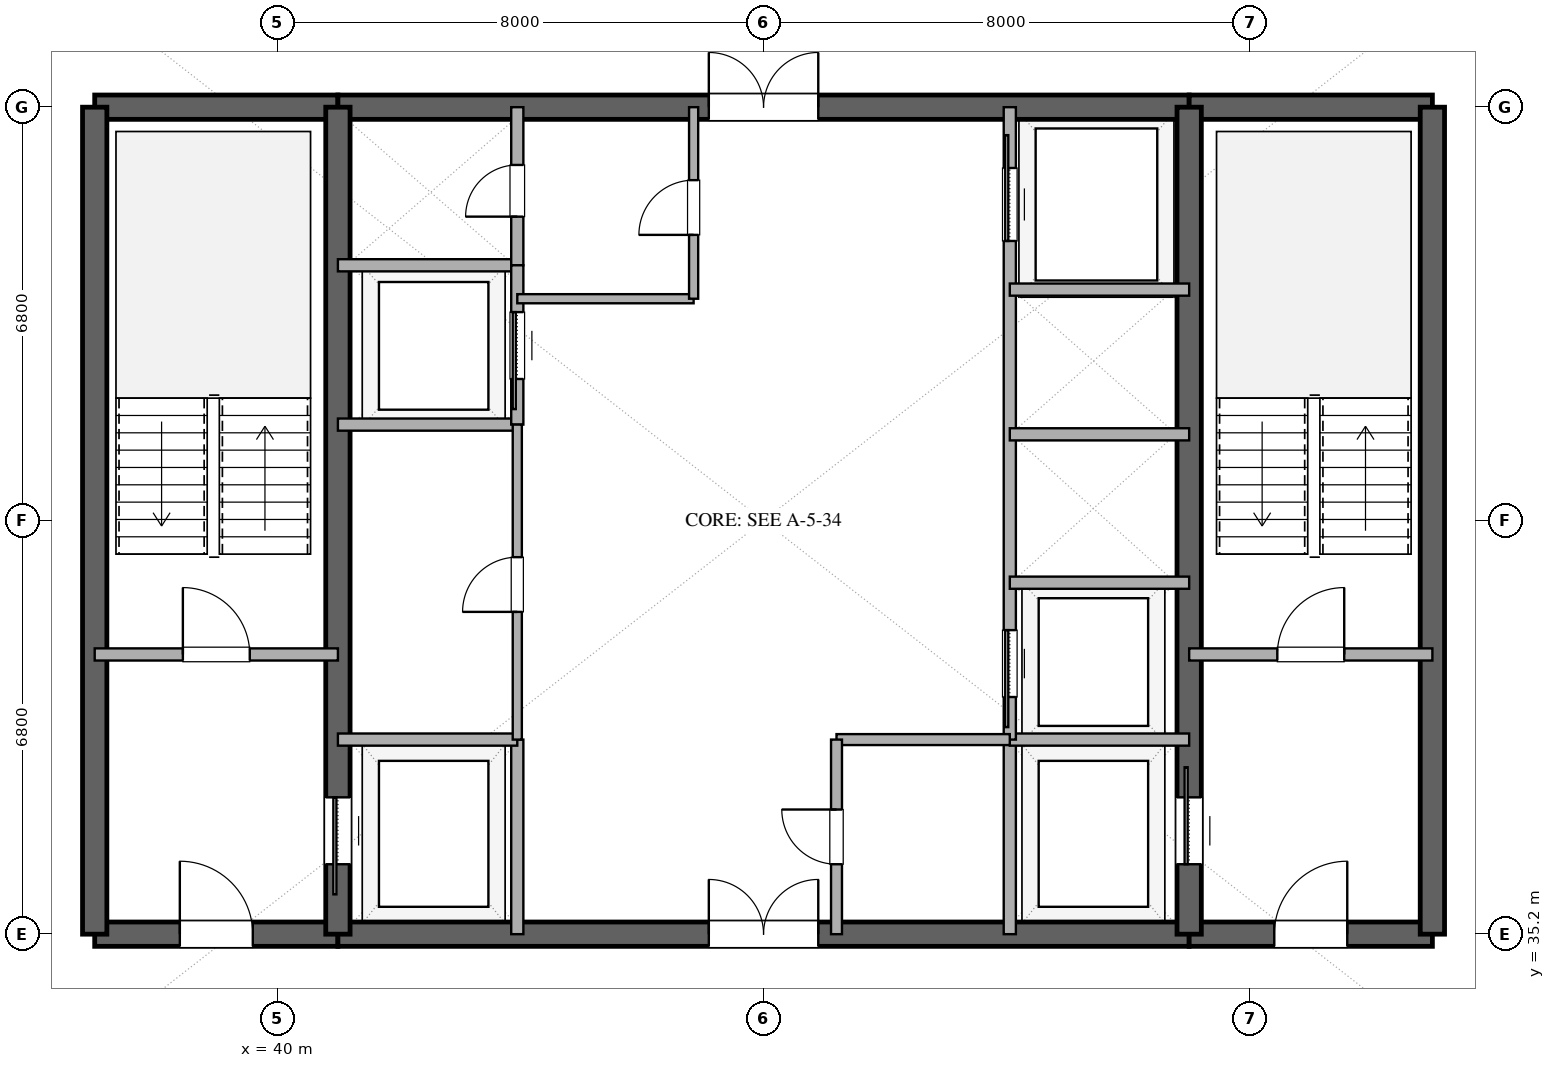
"""IFC4 building model, lengths in metres.
Left out: names, types, materials, properties, quantities, classifications, styles, units other than length and angle.
Written with IfcOpenShell. Run it as: python <this file> out.ifc"""

import sys

from ifc_helpers import new_model, si_unit, direction, frame, frame_2d, origin, place, context, subcontext, project, spatial, rectangle, extrude, element, fill, save


model = new_model("IFC4")
c1 = context("Model", 3, precision=1e-05, world=origin(), true_north=direction((0.0, 1.0)))
c2 = subcontext(c1, "Body", "Model", "MODEL_VIEW")
j1 = project(units=[si_unit("LENGTHUNIT", "METRE"), si_unit("PLANEANGLEUNIT", "RADIAN")], contexts=[c1])
p1 = place(None, origin())
s1 = spatial("IfcSite", under=j1, at=p1, CompositionType="ELEMENT")
p2 = place(p1, origin())
s2 = spatial("IfcBuilding", under=s1, at=p2, CompositionType="ELEMENT")
p3 = place(p2, frame((0.0, 0.0, 235.2)))
s3 = spatial("IfcBuildingStorey", under=s2, at=p3, CompositionType="ELEMENT", Elevation=235.2)
p4 = place(p3, frame((37.0, 35.2, 0.0), z_axis=(0.0, 0.0, 1.0), x_axis=(1.0, 0.0, 0.0)))
e1 = element("IfcWall", 1, at=p4, inside=s3, PredefinedType="SHEAR", context=c2, shape_type="SweptSolid", body=[
    extrude(rectangle(XDim=4.0, YDim=0.4, at=frame_2d((2.0, 0.0))), origin(), (0.0, 0.0, 1.0), 3.36),
])
p5 = place(p4, frame((1.4, 0.0, 0.0)))
e2 = element("IfcOpeningElement", 2, at=p5, cuts=e1, PredefinedType="OPENING", context=c2, shape_type="SweptSolid", body=[
    extrude(rectangle(XDim=1.2, YDim=2.15, at=frame_2d((0.6, 1.075))), frame((0.0, 0.21, 0.0), z_axis=(0.0, -1.0, 0.0), x_axis=(1.0, 0.0, 0.0)), (0.0, 0.0, 1.0), 0.42),
])
p6 = place(p3, frame((41.0, 35.2, 0.0), z_axis=(0.0, 0.0, 1.0), x_axis=(1.0, 0.0, 0.0)))
e3 = element("IfcWall", 3, at=p6, inside=s3, PredefinedType="SHEAR", context=c2, shape_type="SweptSolid", body=[
    extrude(rectangle(XDim=14.0, YDim=0.4, at=frame_2d((7.0, 0.0))), origin(), (0.0, 0.0, 1.0), 3.36),
])
p7 = place(p6, frame((6.1, 0.0, 0.0)))
e4 = element("IfcOpeningElement", 4, at=p7, cuts=e3, PredefinedType="OPENING", context=c2, shape_type="SweptSolid", body=[
    extrude(rectangle(XDim=1.8, YDim=2.25, at=frame_2d((0.9, 1.125))), frame((0.0, 0.21, 0.0), z_axis=(0.0, -1.0, 0.0), x_axis=(1.0, 0.0, 0.0)), (0.0, 0.0, 1.0), 0.42),
])
p8 = place(p3, frame((55.0, 35.2, 0.0), z_axis=(0.0, 0.0, 1.0), x_axis=(1.0, 0.0, 0.0)))
e5 = element("IfcWall", 5, at=p8, inside=s3, PredefinedType="SHEAR", context=c2, shape_type="SweptSolid", body=[
    extrude(rectangle(XDim=4.0, YDim=0.4, at=frame_2d((2.0, 0.0))), origin(), (0.0, 0.0, 1.0), 3.36),
])
p9 = place(p8, frame((1.4, 0.0, 0.0)))
e6 = element("IfcOpeningElement", 6, at=p9, cuts=e5, PredefinedType="OPENING", context=c2, shape_type="SweptSolid", body=[
    extrude(rectangle(XDim=1.2, YDim=2.15, at=frame_2d((0.6, 1.075))), frame((0.0, 0.21, 0.0), z_axis=(0.0, -1.0, 0.0), x_axis=(1.0, 0.0, 0.0)), (0.0, 0.0, 1.0), 0.42),
])
p10 = place(p3, frame((37.0, 48.8, 0.0), z_axis=(0.0, 0.0, 1.0), x_axis=(1.0, 0.0, 0.0)))
e7 = element("IfcWall", 7, at=p10, inside=s3, PredefinedType="SHEAR", context=c2, shape_type="SweptSolid", body=[
    extrude(rectangle(XDim=4.0, YDim=0.4, at=frame_2d((2.0, 0.0))), origin(), (0.0, 0.0, 1.0), 3.36),
])
p11 = place(p3, frame((41.0, 48.8, 0.0), z_axis=(0.0, 0.0, 1.0), x_axis=(1.0, 0.0, 0.0)))
e8 = element("IfcWall", 8, at=p11, inside=s3, PredefinedType="SHEAR", context=c2, shape_type="SweptSolid", body=[
    extrude(rectangle(XDim=14.0, YDim=0.4, at=frame_2d((7.0, 0.0))), origin(), (0.0, 0.0, 1.0), 3.36),
])
p12 = place(p11, frame((6.1, 0.0, 0.0)))
e9 = element("IfcOpeningElement", 9, at=p12, cuts=e8, PredefinedType="OPENING", context=c2, shape_type="SweptSolid", body=[
    extrude(rectangle(XDim=1.8, YDim=2.25, at=frame_2d((0.9, 1.125))), frame((0.0, 0.21, 0.0), z_axis=(0.0, -1.0, 0.0), x_axis=(1.0, 0.0, 0.0)), (0.0, 0.0, 1.0), 0.42),
])
p13 = place(p3, frame((55.0, 48.8, 0.0), z_axis=(0.0, 0.0, 1.0), x_axis=(1.0, 0.0, 0.0)))
e10 = element("IfcWall", 10, at=p13, inside=s3, PredefinedType="SHEAR", context=c2, shape_type="SweptSolid", body=[
    extrude(rectangle(XDim=4.0, YDim=0.4, at=frame_2d((2.0, 0.0))), origin(), (0.0, 0.0, 1.0), 3.36),
])
for number, where, z_axis, x_axis in (
    (11, (37.0, 35.2, 0.0), (0.0, 0.0, 1.0), (0.0, 1.0, 0.0)),
    (12, (59.0, 35.2, 0.0), (0.0, 0.0, 1.0), (0.0, 1.0, 0.0)),
):
    element("IfcWall", number, at=place(p3, frame(where, z_axis=z_axis, x_axis=x_axis)), inside=s3, PredefinedType="SHEAR", context=c2, shape_type="SweptSolid", body=[
        extrude(rectangle(XDim=13.6, YDim=0.4, at=frame_2d((6.8, 0.0))), origin(), (0.0, 0.0, 1.0), 3.36),
    ])
p14 = place(p3, frame((41.0, 35.2, 0.0), z_axis=(0.0, 0.0, 1.0), x_axis=(0.0, 1.0, 0.0)))
e13 = element("IfcWall", 13, at=p14, inside=s3, PredefinedType="SHEAR", context=c2, shape_type="SweptSolid", body=[
    extrude(rectangle(XDim=13.6, YDim=0.4, at=frame_2d((6.8, 0.0))), origin(), (0.0, 0.0, 1.0), 3.36),
])
p15 = place(p14, frame((1.15, 0.0, 0.0)))
e14 = element("IfcOpeningElement", 14, at=p15, cuts=e13, PredefinedType="OPENING", context=c2, shape_type="SweptSolid", body=[
    extrude(rectangle(XDim=1.1, YDim=2.2, at=frame_2d((0.55, 1.1))), frame((0.0, 0.21, 0.0), z_axis=(0.0, -1.0, 0.0), x_axis=(1.0, 0.0, 0.0)), (0.0, 0.0, 1.0), 0.42),
])
p16 = place(p3, frame((55.0, 35.2, 0.0), z_axis=(0.0, 0.0, 1.0), x_axis=(0.0, 1.0, 0.0)))
e15 = element("IfcWall", 15, at=p16, inside=s3, PredefinedType="SHEAR", context=c2, shape_type="SweptSolid", body=[
    extrude(rectangle(XDim=13.6, YDim=0.4, at=frame_2d((6.8, 0.0))), origin(), (0.0, 0.0, 1.0), 3.36),
])
p17 = place(p16, frame((1.15, 0.0, 0.0)))
e16 = element("IfcOpeningElement", 16, at=p17, cuts=e15, PredefinedType="OPENING", context=c2, shape_type="SweptSolid", body=[
    extrude(rectangle(XDim=1.1, YDim=2.2, at=frame_2d((0.55, 1.1))), frame((0.0, 0.21, 0.0), z_axis=(0.0, -1.0, 0.0), x_axis=(1.0, 0.0, 0.0)), (0.0, 0.0, 1.0), 0.42),
])
p18 = place(p3, frame((37.0, 39.8, 0.0), z_axis=(0.0, 0.0, 1.0), x_axis=(1.0, 0.0, 0.0)))
e17 = element("IfcWall", 17, at=p18, inside=s3, PredefinedType="SOLIDWALL", context=c2, shape_type="SweptSolid", body=[
    extrude(rectangle(XDim=4.0, YDim=0.2, at=frame_2d((2.0, 0.0))), origin(), (0.0, 0.0, 1.0), 2.72),
])
p19 = place(p18, frame((1.45, 0.0, 0.0)))
e18 = element("IfcOpeningElement", 18, at=p19, cuts=e17, PredefinedType="OPENING", context=c2, shape_type="SweptSolid", body=[
    extrude(rectangle(XDim=1.1, YDim=2.15, at=frame_2d((0.55, 1.075))), frame((0.0, 0.11, 0.0), z_axis=(0.0, -1.0, 0.0), x_axis=(1.0, 0.0, 0.0)), (0.0, 0.0, 1.0), 0.22),
])
p20 = place(p3, frame((55.0, 39.8, 0.0), z_axis=(0.0, 0.0, 1.0), x_axis=(1.0, 0.0, 0.0)))
e19 = element("IfcWall", 19, at=p20, inside=s3, PredefinedType="SOLIDWALL", context=c2, shape_type="SweptSolid", body=[
    extrude(rectangle(XDim=4.0, YDim=0.2, at=frame_2d((2.0, 0.0))), origin(), (0.0, 0.0, 1.0), 2.72),
])
p21 = place(p20, frame((1.45, 0.0, 0.0)))
e20 = element("IfcOpeningElement", 20, at=p21, cuts=e19, PredefinedType="OPENING", context=c2, shape_type="SweptSolid", body=[
    extrude(rectangle(XDim=1.1, YDim=2.15, at=frame_2d((0.55, 1.075))), frame((0.0, 0.11, 0.0), z_axis=(0.0, -1.0, 0.0), x_axis=(1.0, 0.0, 0.0)), (0.0, 0.0, 1.0), 0.22),
])
p22 = place(p3, frame((43.95, 35.2, 0.0), z_axis=(0.0, 0.0, 1.0), x_axis=(0.0, 1.0, 0.0)))
e21 = element("IfcWall", 21, at=p22, inside=s3, PredefinedType="SOLIDWALL", context=c2, shape_type="SweptSolid", body=[
    extrude(rectangle(XDim=3.2, YDim=0.2, at=frame_2d((1.6, 0.0))), origin(), (0.0, 0.0, 1.0), 2.72),
])
p23 = place(p3, frame((41.0, 38.4, 0.0), z_axis=(0.0, 0.0, 1.0), x_axis=(1.0, 0.0, 0.0)))
e22 = element("IfcWall", 22, at=p23, inside=s3, PredefinedType="SOLIDWALL", context=c2, shape_type="SweptSolid", body=[
    extrude(rectangle(XDim=2.95, YDim=0.2, at=frame_2d((1.475, 0.0))), origin(), (0.0, 0.0, 1.0), 2.72),
])
p24 = place(p3, frame((52.05, 35.2, 0.0), z_axis=(0.0, 0.0, 1.0), x_axis=(0.0, 1.0, 0.0)))
e23 = element("IfcWall", 23, at=p24, inside=s3, PredefinedType="SOLIDWALL", context=c2, shape_type="SweptSolid", body=[
    extrude(rectangle(XDim=3.2, YDim=0.2, at=frame_2d((1.6, 0.0))), origin(), (0.0, 0.0, 1.0), 2.72),
])
for number, where, z_axis, x_axis in (
    (24, (52.05, 38.4, 0.0), (0.0, 0.0, 1.0), (1.0, 0.0, 0.0)),
    (25, (41.0, 46.2, 0.0), (0.0, 0.0, 1.0), (1.0, 0.0, 0.0)),
):
    element("IfcWall", number, at=place(p3, frame(where, z_axis=z_axis, x_axis=x_axis)), inside=s3, PredefinedType="SOLIDWALL", context=c2, shape_type="SweptSolid", body=[
        extrude(rectangle(XDim=2.95, YDim=0.2, at=frame_2d((1.475, 0.0))), origin(), (0.0, 0.0, 1.0), 2.72),
    ])
p25 = place(p3, frame((43.95, 46.2, 0.0), z_axis=(0.0, 0.0, 1.0), x_axis=(0.0, 1.0, 0.0)))
e26 = element("IfcWall", 26, at=p25, inside=s3, PredefinedType="SOLIDWALL", context=c2, shape_type="SweptSolid", body=[
    extrude(rectangle(XDim=2.6, YDim=0.2, at=frame_2d((1.3, 0.0))), origin(), (0.0, 0.0, 1.0), 2.72),
])
p26 = place(p25, frame((0.8, 0.0, 0.0)))
e27 = element("IfcOpeningElement", 27, at=p26, cuts=e26, PredefinedType="OPENING", context=c2, shape_type="SweptSolid", body=[
    extrude(rectangle(XDim=0.85, YDim=2.15, at=frame_2d((0.425, 1.075))), frame((0.0, 0.11, 0.0), z_axis=(0.0, -1.0, 0.0), x_axis=(1.0, 0.0, 0.0)), (0.0, 0.0, 1.0), 0.22),
])
p27 = place(p3, frame((41.0, 43.58, 0.0), z_axis=(0.0, 0.0, 1.0), x_axis=(1.0, 0.0, 0.0)))
e28 = element("IfcWall", 28, at=p27, inside=s3, PredefinedType="SOLIDWALL", context=c2, shape_type="SweptSolid", body=[
    extrude(rectangle(XDim=2.95, YDim=0.2, at=frame_2d((1.475, 0.0))), origin(), (0.0, 0.0, 1.0), 2.72),
])
p28 = place(p3, frame((43.95, 43.58, 0.0), z_axis=(0.0, 0.0, 1.0), x_axis=(0.0, 1.0, 0.0)))
e29 = element("IfcWall", 29, at=p28, inside=s3, PredefinedType="SOLIDWALL", context=c2, shape_type="SweptSolid", body=[
    extrude(rectangle(XDim=2.62, YDim=0.2, at=frame_2d((1.31, 0.0))), origin(), (0.0, 0.0, 1.0), 2.72),
])
p29 = place(p28, frame((0.75, 0.0, 0.0)))
e30 = element("IfcOpeningElement", 30, at=p29, cuts=e29, PredefinedType="OPENING", context=c2, shape_type="SweptSolid", body=[
    extrude(rectangle(XDim=1.1, YDim=2.2, at=frame_2d((0.55, 1.1))), frame((0.0, 0.11, 0.0), z_axis=(0.0, -1.0, 0.0), x_axis=(1.0, 0.0, 0.0)), (0.0, 0.0, 1.0), 0.22),
])
p30 = place(p3, frame((43.95, 38.4, 0.0), z_axis=(0.0, 0.0, 1.0), x_axis=(0.0, 1.0, 0.0)))
e31 = element("IfcWall", 31, at=p30, inside=s3, PredefinedType="PARTITIONING", context=c2, shape_type="SweptSolid", body=[
    extrude(rectangle(XDim=5.18, YDim=0.15, at=frame_2d((2.59, 0.0))), origin(), (0.0, 0.0, 1.0), 2.72),
])
p31 = place(p30, frame((2.1, 0.0, 0.0)))
e32 = element("IfcOpeningElement", 32, at=p31, cuts=e31, PredefinedType="OPENING", context=c2, shape_type="SweptSolid", body=[
    extrude(rectangle(XDim=0.9, YDim=2.15, at=frame_2d((0.45, 1.075))), frame((0.0, 0.085, 0.0), z_axis=(0.0, -1.0, 0.0), x_axis=(1.0, 0.0, 0.0)), (0.0, 0.0, 1.0), 0.17),
])
p32 = place(p3, frame((52.05, 38.4, 0.0), z_axis=(0.0, 0.0, 1.0), x_axis=(0.0, 1.0, 0.0)))
e33 = element("IfcWall", 33, at=p32, inside=s3, PredefinedType="SOLIDWALL", context=c2, shape_type="SweptSolid", body=[
    extrude(rectangle(XDim=10.4, YDim=0.2, at=frame_2d((5.2, 0.0))), origin(), (0.0, 0.0, 1.0), 2.72),
])
p33 = place(p32, frame((0.7, 0.0, 0.0)))
e34 = element("IfcOpeningElement", 34, at=p33, cuts=e33, PredefinedType="OPENING", context=c2, shape_type="SweptSolid", body=[
    extrude(rectangle(XDim=1.1, YDim=2.2, at=frame_2d((0.55, 1.1))), frame((0.0, 0.11, 0.0), z_axis=(0.0, -1.0, 0.0), x_axis=(1.0, 0.0, 0.0)), (0.0, 0.0, 1.0), 0.22),
])
p34 = place(p32, frame((8.2, 0.0, 0.0)))
e35 = element("IfcOpeningElement", 35, at=p34, cuts=e33, PredefinedType="OPENING", context=c2, shape_type="SweptSolid", body=[
    extrude(rectangle(XDim=1.2, YDim=2.2, at=frame_2d((0.6, 1.1))), frame((0.0, 0.11, 0.0), z_axis=(0.0, -1.0, 0.0), x_axis=(1.0, 0.0, 0.0)), (0.0, 0.0, 1.0), 0.22),
])
for number, where, z_axis, x_axis in (
    (36, (52.05, 40.98, 0.0), (0.0, 0.0, 1.0), (1.0, 0.0, 0.0)),
    (37, (52.05, 43.42, 0.0), (0.0, 0.0, 1.0), (1.0, 0.0, 0.0)),
    (38, (52.05, 45.8, 0.0), (0.0, 0.0, 1.0), (1.0, 0.0, 0.0)),
):
    element("IfcWall", number, at=place(p3, frame(where, z_axis=z_axis, x_axis=x_axis)), inside=s3, PredefinedType="SOLIDWALL", context=c2, shape_type="SweptSolid", body=[
        extrude(rectangle(XDim=2.95, YDim=0.2, at=frame_2d((1.475, 0.0))), origin(), (0.0, 0.0, 1.0), 2.72),
    ])
p35 = place(p3, frame((43.95, 45.65, 0.0), z_axis=(0.0, 0.0, 1.0), x_axis=(1.0, 0.0, 0.0)))
e39 = element("IfcWall", 39, at=p35, inside=s3, PredefinedType="PARTITIONING", context=c2, shape_type="SweptSolid", body=[
    extrude(rectangle(XDim=2.9, YDim=0.15, at=frame_2d((1.45, 0.0))), origin(), (0.0, 0.0, 1.0), 2.72),
])
p36 = place(p3, frame((46.85, 45.65, 0.0), z_axis=(0.0, 0.0, 1.0), x_axis=(0.0, 1.0, 0.0)))
e40 = element("IfcWall", 40, at=p36, inside=s3, PredefinedType="PARTITIONING", context=c2, shape_type="SweptSolid", body=[
    extrude(rectangle(XDim=3.15, YDim=0.15, at=frame_2d((1.575, 0.0))), origin(), (0.0, 0.0, 1.0), 2.72),
])
p37 = place(p36, frame((1.05, 0.0, 0.0)))
e41 = element("IfcOpeningElement", 41, at=p37, cuts=e40, PredefinedType="OPENING", context=c2, shape_type="SweptSolid", body=[
    extrude(rectangle(XDim=0.9, YDim=2.15, at=frame_2d((0.45, 1.075))), frame((0.0, 0.085, 0.0), z_axis=(0.0, -1.0, 0.0), x_axis=(1.0, 0.0, 0.0)), (0.0, 0.0, 1.0), 0.17),
])
p38 = place(p3, frame((49.2, 38.4, 0.0), z_axis=(0.0, 0.0, 1.0), x_axis=(1.0, 0.0, 0.0)))
e42 = element("IfcWall", 42, at=p38, inside=s3, PredefinedType="PLUMBINGWALL", context=c2, shape_type="SweptSolid", body=[
    extrude(rectangle(XDim=2.85, YDim=0.18, at=frame_2d((1.425, 0.0))), origin(), (0.0, 0.0, 1.0), 2.72),
])
p39 = place(p3, frame((49.2, 35.2, 0.0), z_axis=(0.0, 0.0, 1.0), x_axis=(0.0, 1.0, 0.0)))
e43 = element("IfcWall", 43, at=p39, inside=s3, PredefinedType="PLUMBINGWALL", context=c2, shape_type="SweptSolid", body=[
    extrude(rectangle(XDim=3.2, YDim=0.18, at=frame_2d((1.6, 0.0))), origin(), (0.0, 0.0, 1.0), 2.72),
])
p40 = place(p39, frame((1.15, 0.0, 0.0)))
e44 = element("IfcOpeningElement", 44, at=p40, cuts=e43, PredefinedType="OPENING", context=c2, shape_type="SweptSolid", body=[
    extrude(rectangle(XDim=0.9, YDim=2.1, at=frame_2d((0.45, 1.05))), frame((0.0, 0.1, 0.0), z_axis=(0.0, -1.0, 0.0), x_axis=(1.0, 0.0, 0.0)), (0.0, 0.0, 1.0), 0.2),
])
p41 = place(p15, origin())
e45 = element("IfcDoor", 45, at=p41, inside=s3, OperationType="SLIDING_TO_LEFT", PredefinedType="DOOR", context=c2, shape_type="SweptSolid", body=[
    extrude(rectangle(XDim=1.1, YDim=2.2, at=frame_2d((0.55, 1.1))), frame((0.0, 0.025, 0.0), z_axis=(0.0, -1.0, 0.0), x_axis=(1.0, 0.0, 0.0)), (0.0, 0.0, 1.0), 0.05),
])
fill(e14, e45)
p42 = place(p17, origin())
e46 = element("IfcDoor", 46, at=p42, inside=s3, OperationType="SLIDING_TO_RIGHT", PredefinedType="DOOR", context=c2, shape_type="SweptSolid", body=[
    extrude(rectangle(XDim=1.1, YDim=2.2, at=frame_2d((0.55, 1.1))), frame((0.0, 0.025, 0.0), z_axis=(0.0, -1.0, 0.0), x_axis=(1.0, 0.0, 0.0)), (0.0, 0.0, 1.0), 0.05),
])
fill(e16, e46)
p43 = place(p5, origin())
e47 = element("IfcDoor", 47, at=p43, inside=s3, OperationType="SINGLE_SWING_LEFT", PredefinedType="DOOR", context=c2, shape_type="SweptSolid", body=[
    extrude(rectangle(XDim=1.2, YDim=2.15, at=frame_2d((0.6, 1.075))), frame((0.0, 0.025, 0.0), z_axis=(0.0, -1.0, 0.0), x_axis=(1.0, 0.0, 0.0)), (0.0, 0.0, 1.0), 0.05),
])
fill(e2, e47)
p44 = place(p9, origin())
e48 = element("IfcDoor", 48, at=p44, inside=s3, OperationType="SINGLE_SWING_RIGHT", PredefinedType="DOOR", context=c2, shape_type="SweptSolid", body=[
    extrude(rectangle(XDim=1.2, YDim=2.15, at=frame_2d((0.6, 1.075))), frame((0.0, 0.025, 0.0), z_axis=(0.0, -1.0, 0.0), x_axis=(1.0, 0.0, 0.0)), (0.0, 0.0, 1.0), 0.05),
])
fill(e6, e48)
p45 = place(p7, origin())
e49 = element("IfcDoor", 49, at=p45, inside=s3, OperationType="DOUBLE_DOOR_SINGLE_SWING", PredefinedType="DOOR", context=c2, shape_type="SweptSolid", body=[
    extrude(rectangle(XDim=1.8, YDim=2.25, at=frame_2d((0.9, 1.125))), frame((0.0, 0.025, 0.0), z_axis=(0.0, -1.0, 0.0), x_axis=(1.0, 0.0, 0.0)), (0.0, 0.0, 1.0), 0.05),
])
fill(e4, e49)
p46 = place(p12, origin())
e50 = element("IfcDoor", 50, at=p46, inside=s3, OperationType="DOUBLE_DOOR_SINGLE_SWING", PredefinedType="DOOR", context=c2, shape_type="SweptSolid", body=[
    extrude(rectangle(XDim=1.8, YDim=2.25, at=frame_2d((0.9, 1.125))), frame((0.0, 0.025, 0.0), z_axis=(0.0, -1.0, 0.0), x_axis=(1.0, 0.0, 0.0)), (0.0, 0.0, 1.0), 0.05),
])
fill(e9, e50)
p47 = place(p19, origin())
e51 = element("IfcDoor", 51, at=p47, inside=s3, OperationType="SINGLE_SWING_LEFT", PredefinedType="DOOR", context=c2, shape_type="SweptSolid", body=[
    extrude(rectangle(XDim=1.1, YDim=2.15, at=frame_2d((0.55, 1.075))), frame((0.0, 0.025, 0.0), z_axis=(0.0, -1.0, 0.0), x_axis=(1.0, 0.0, 0.0)), (0.0, 0.0, 1.0), 0.05),
])
fill(e18, e51)
p48 = place(p21, origin())
e52 = element("IfcDoor", 52, at=p48, inside=s3, OperationType="SINGLE_SWING_RIGHT", PredefinedType="DOOR", context=c2, shape_type="SweptSolid", body=[
    extrude(rectangle(XDim=1.1, YDim=2.15, at=frame_2d((0.55, 1.075))), frame((0.0, 0.025, 0.0), z_axis=(0.0, -1.0, 0.0), x_axis=(1.0, 0.0, 0.0)), (0.0, 0.0, 1.0), 0.05),
])
fill(e20, e52)
p49 = place(p26, origin())
e53 = element("IfcDoor", 53, at=p49, inside=s3, OperationType="SINGLE_SWING_LEFT", PredefinedType="DOOR", context=c2, shape_type="SweptSolid", body=[
    extrude(rectangle(XDim=0.85, YDim=2.15, at=frame_2d((0.425, 1.075))), frame((0.0, 0.025, 0.0), z_axis=(0.0, -1.0, 0.0), x_axis=(1.0, 0.0, 0.0)), (0.0, 0.0, 1.0), 0.05),
])
fill(e27, e53)
p50 = place(p29, origin())
e54 = element("IfcDoor", 54, at=p50, inside=s3, OperationType="SLIDING_TO_LEFT", PredefinedType="DOOR", context=c2, shape_type="SweptSolid", body=[
    extrude(rectangle(XDim=1.1, YDim=2.2, at=frame_2d((0.55, 1.1))), frame((0.0, 0.025, 0.0), z_axis=(0.0, -1.0, 0.0), x_axis=(1.0, 0.0, 0.0)), (0.0, 0.0, 1.0), 0.05),
])
fill(e30, e54)
p51 = place(p31, origin())
e55 = element("IfcDoor", 55, at=p51, inside=s3, OperationType="SINGLE_SWING_LEFT", PredefinedType="DOOR", context=c2, shape_type="SweptSolid", body=[
    extrude(rectangle(XDim=0.9, YDim=2.15, at=frame_2d((0.45, 1.075))), frame((0.0, 0.025, 0.0), z_axis=(0.0, -1.0, 0.0), x_axis=(1.0, 0.0, 0.0)), (0.0, 0.0, 1.0), 0.05),
])
fill(e32, e55)
p52 = place(p33, origin())
e56 = element("IfcDoor", 56, at=p52, inside=s3, OperationType="SLIDING_TO_LEFT", PredefinedType="DOOR", context=c2, shape_type="SweptSolid", body=[
    extrude(rectangle(XDim=1.1, YDim=2.2, at=frame_2d((0.55, 1.1))), frame((0.0, 0.025, 0.0), z_axis=(0.0, -1.0, 0.0), x_axis=(1.0, 0.0, 0.0)), (0.0, 0.0, 1.0), 0.05),
])
fill(e34, e56)
p53 = place(p34, origin())
e57 = element("IfcDoor", 57, at=p53, inside=s3, OperationType="SLIDING_TO_RIGHT", PredefinedType="DOOR", context=c2, shape_type="SweptSolid", body=[
    extrude(rectangle(XDim=1.2, YDim=2.2, at=frame_2d((0.6, 1.1))), frame((0.0, 0.025, 0.0), z_axis=(0.0, -1.0, 0.0), x_axis=(1.0, 0.0, 0.0)), (0.0, 0.0, 1.0), 0.05),
])
fill(e35, e57)
p54 = place(p37, origin())
e58 = element("IfcDoor", 58, at=p54, inside=s3, OperationType="SINGLE_SWING_LEFT", PredefinedType="DOOR", context=c2, shape_type="SweptSolid", body=[
    extrude(rectangle(XDim=0.9, YDim=2.15, at=frame_2d((0.45, 1.075))), frame((0.0, 0.025, 0.0), z_axis=(0.0, -1.0, 0.0), x_axis=(1.0, 0.0, 0.0)), (0.0, 0.0, 1.0), 0.05),
])
fill(e41, e58)
p55 = place(p40, origin())
e59 = element("IfcDoor", 59, at=p55, inside=s3, OperationType="SINGLE_SWING_RIGHT", PredefinedType="DOOR", context=c2, shape_type="SweptSolid", body=[
    extrude(rectangle(XDim=0.9, YDim=2.1, at=frame_2d((0.45, 1.05))), frame((0.0, 0.025, 0.0), z_axis=(0.0, -1.0, 0.0), x_axis=(1.0, 0.0, 0.0)), (0.0, 0.0, 1.0), 0.05),
])
fill(e44, e59)
save(model, sys.argv[1])
